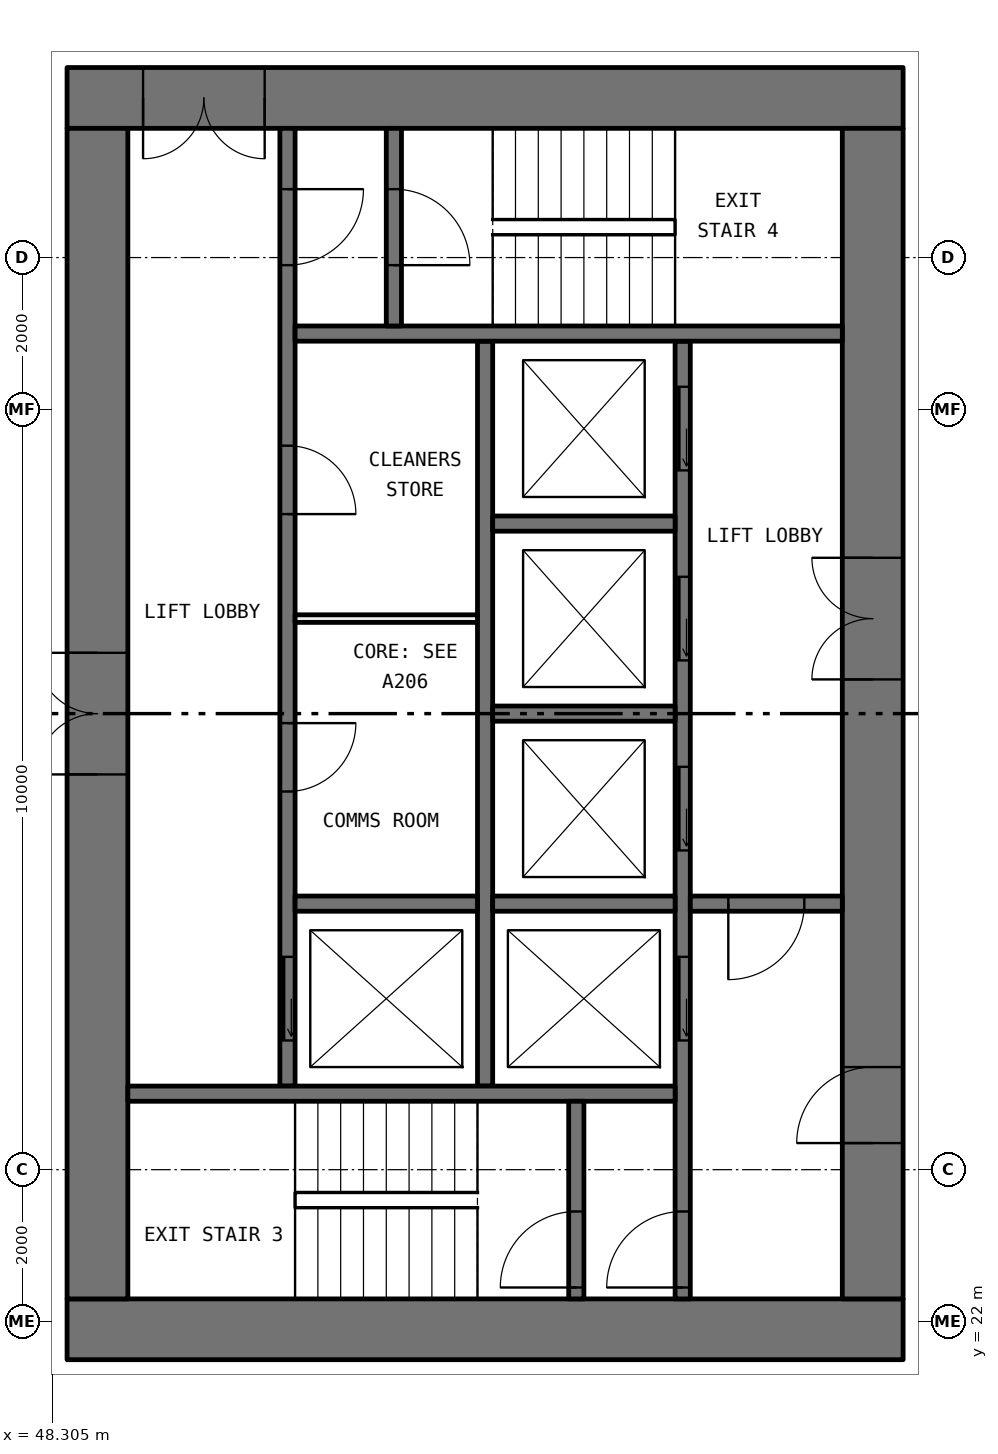
"""IFC4 building model, lengths in metres.
Left out: names, types, materials, properties, quantities, classifications, styles, units other than length and angle.
Written with IfcOpenShell. Run it as: python <this file> out.ifc"""

import sys

from ifc_helpers import new_model, si_unit, direction, frame, frame_2d, origin, place, context, subcontext, project, spatial, rectangle, extrude, element, fill, save


model = new_model("IFC4")
c1 = context("Model", 3, precision=1e-05, world=origin(), true_north=direction((0.0, 1.0)))
c2 = subcontext(c1, "Body", "Model", "MODEL_VIEW")
j1 = project(units=[si_unit("LENGTHUNIT", "METRE"), si_unit("PLANEANGLEUNIT", "RADIAN")], contexts=[c1])
p1 = place(None, origin())
s1 = spatial("IfcSite", under=j1, at=p1, CompositionType="ELEMENT")
p2 = place(p1, origin())
s2 = spatial("IfcBuilding", under=s1, at=p2, CompositionType="ELEMENT")
p3 = place(p2, frame((0.0, 0.0, 30.0)))
s3 = spatial("IfcBuildingStorey", under=s2, at=p3, CompositionType="ELEMENT", Elevation=30.0)
p4 = place(p3, frame((59.5, 21.9, 0.0), z_axis=(0.0, 0.0, 1.0), x_axis=(-1.0, 0.0, 0.0)))
e1 = element("IfcWall", 1, at=p4, inside=s3, PredefinedType="SHEAR", context=c2, shape_type="SweptSolid", body=[
    extrude(rectangle(XDim=11.0, YDim=0.8, at=frame_2d((5.5, 0.0))), origin(), (0.0, 0.0, 1.0), 3.05),
])
p5 = place(p3, frame((59.5, 38.1, 0.0), z_axis=(0.0, 0.0, 1.0), x_axis=(-1.0, 0.0, 0.0)))
e2 = element("IfcWall", 2, at=p5, inside=s3, PredefinedType="SHEAR", context=c2, shape_type="SweptSolid", body=[
    extrude(rectangle(XDim=11.0, YDim=0.8, at=frame_2d((5.5, 0.0))), origin(), (0.0, 0.0, 1.0), 3.05),
])
p6 = place(p5, frame((8.4, 0.0, 0.0)))
e3 = element("IfcOpeningElement", 3, at=p6, cuts=e2, PredefinedType="OPENING", context=c2, shape_type="SweptSolid", body=[
    extrude(rectangle(XDim=1.6, YDim=2.1, at=frame_2d((0.8, 1.05))), frame((0.0, 0.41, 0.0), z_axis=(0.0, -1.0, 0.0), x_axis=(1.0, 0.0, 0.0)), (0.0, 0.0, 1.0), 0.82),
])
p7 = place(p3, frame((59.1, 22.3, 0.0), z_axis=(0.0, 0.0, 1.0), x_axis=(0.0, 1.0, 0.0)))
e4 = element("IfcWall", 4, at=p7, inside=s3, PredefinedType="SHEAR", context=c2, shape_type="SweptSolid", body=[
    extrude(rectangle(XDim=15.4, YDim=0.8, at=frame_2d((7.7, 0.0))), origin(), (0.0, 0.0, 1.0), 3.05),
])
p8 = place(p7, frame((8.15, 0.0, 0.0)))
e5 = element("IfcOpeningElement", 5, at=p8, cuts=e4, PredefinedType="OPENING", context=c2, shape_type="SweptSolid", body=[
    extrude(rectangle(XDim=1.6, YDim=2.1, at=frame_2d((0.8, 1.05))), frame((0.0, 0.41, 0.0), z_axis=(0.0, -1.0, 0.0), x_axis=(1.0, 0.0, 0.0)), (0.0, 0.0, 1.0), 0.82),
])
p9 = place(p7, frame((2.05, 0.0, 0.0)))
e6 = element("IfcOpeningElement", 6, at=p9, cuts=e4, PredefinedType="OPENING", context=c2, shape_type="SweptSolid", body=[
    extrude(rectangle(XDim=1.0, YDim=2.1, at=frame_2d((0.5, 1.05))), frame((0.0, 0.41, 0.0), z_axis=(0.0, -1.0, 0.0), x_axis=(1.0, 0.0, 0.0)), (0.0, 0.0, 1.0), 0.82),
])
p10 = place(p3, frame((48.9, 22.3, 0.0), z_axis=(0.0, 0.0, 1.0), x_axis=(0.0, 1.0, 0.0)))
e7 = element("IfcWall", 7, at=p10, inside=s3, PredefinedType="SHEAR", context=c2, shape_type="SweptSolid", body=[
    extrude(rectangle(XDim=15.4, YDim=0.8, at=frame_2d((7.7, 0.0))), origin(), (0.0, 0.0, 1.0), 3.05),
])
p11 = place(p10, frame((6.9, 0.0, 0.0)))
e8 = element("IfcOpeningElement", 8, at=p11, cuts=e7, PredefinedType="OPENING", context=c2, shape_type="SweptSolid", body=[
    extrude(rectangle(XDim=1.6, YDim=2.1, at=frame_2d((0.8, 1.05))), frame((0.0, 0.41, 0.0), z_axis=(0.0, -1.0, 0.0), x_axis=(1.0, 0.0, 0.0)), (0.0, 0.0, 1.0), 0.82),
])
p12 = place(p3, frame((56.6, 22.3, 0.0), z_axis=(0.0, 0.0, 1.0), x_axis=(0.0, 1.0, 0.0)))
e9 = element("IfcWall", 9, at=p12, inside=s3, PredefinedType="SOLIDWALL", context=c2, shape_type="SweptSolid", body=[
    extrude(rectangle(XDim=12.6, YDim=0.2, at=frame_2d((6.3, 0.0))), origin(), (0.0, 0.0, 1.0), 3.05),
])
p13 = place(p12, frame((3.4, 0.0, 0.0)))
e10 = element("IfcOpeningElement", 10, at=p13, cuts=e9, PredefinedType="OPENING", context=c2, shape_type="SweptSolid", body=[
    extrude(rectangle(XDim=1.1, YDim=2.1, at=frame_2d((0.55, 1.05))), frame((0.0, 0.11, 0.0), z_axis=(0.0, -1.0, 0.0), x_axis=(1.0, 0.0, 0.0)), (0.0, 0.0, 1.0), 0.22),
])
p14 = place(p12, frame((5.9, 0.0, 0.0)))
e11 = element("IfcOpeningElement", 11, at=p14, cuts=e9, PredefinedType="OPENING", context=c2, shape_type="SweptSolid", body=[
    extrude(rectangle(XDim=1.1, YDim=2.1, at=frame_2d((0.55, 1.05))), frame((0.0, 0.11, 0.0), z_axis=(0.0, -1.0, 0.0), x_axis=(1.0, 0.0, 0.0)), (0.0, 0.0, 1.0), 0.22),
])
p15 = place(p12, frame((8.4, 0.0, 0.0)))
e12 = element("IfcOpeningElement", 12, at=p15, cuts=e9, PredefinedType="OPENING", context=c2, shape_type="SweptSolid", body=[
    extrude(rectangle(XDim=1.1, YDim=2.1, at=frame_2d((0.55, 1.05))), frame((0.0, 0.11, 0.0), z_axis=(0.0, -1.0, 0.0), x_axis=(1.0, 0.0, 0.0)), (0.0, 0.0, 1.0), 0.22),
])
p16 = place(p12, frame((10.9, 0.0, 0.0)))
e13 = element("IfcOpeningElement", 13, at=p16, cuts=e9, PredefinedType="OPENING", context=c2, shape_type="SweptSolid", body=[
    extrude(rectangle(XDim=1.1, YDim=2.1, at=frame_2d((0.55, 1.05))), frame((0.0, 0.11, 0.0), z_axis=(0.0, -1.0, 0.0), x_axis=(1.0, 0.0, 0.0)), (0.0, 0.0, 1.0), 0.22),
])
p17 = place(p12, frame((0.15, 0.0, 0.0)))
e14 = element("IfcOpeningElement", 14, at=p17, cuts=e9, PredefinedType="OPENING", context=c2, shape_type="SweptSolid", body=[
    extrude(rectangle(XDim=1.0, YDim=2.1, at=frame_2d((0.5, 1.05))), frame((0.0, 0.11, 0.0), z_axis=(0.0, -1.0, 0.0), x_axis=(1.0, 0.0, 0.0)), (0.0, 0.0, 1.0), 0.22),
])
p18 = place(p3, frame((51.4, 25.1, 0.0), z_axis=(0.0, 0.0, 1.0), x_axis=(0.0, 1.0, 0.0)))
e15 = element("IfcWall", 15, at=p18, inside=s3, PredefinedType="SOLIDWALL", context=c2, shape_type="SweptSolid", body=[
    extrude(rectangle(XDim=12.6, YDim=0.2, at=frame_2d((6.3, 0.0))), origin(), (0.0, 0.0, 1.0), 3.05),
])
p19 = place(p18, frame((0.6, 0.0, 0.0)))
e16 = element("IfcOpeningElement", 16, at=p19, cuts=e15, PredefinedType="OPENING", context=c2, shape_type="SweptSolid", body=[
    extrude(rectangle(XDim=1.1, YDim=2.1, at=frame_2d((0.55, 1.05))), frame((0.0, 0.11, 0.0), z_axis=(0.0, -1.0, 0.0), x_axis=(1.0, 0.0, 0.0)), (0.0, 0.0, 1.0), 0.22),
])
p20 = place(p18, frame((10.8, 0.0, 0.0)))
e17 = element("IfcOpeningElement", 17, at=p20, cuts=e15, PredefinedType="OPENING", context=c2, shape_type="SweptSolid", body=[
    extrude(rectangle(XDim=1.0, YDim=2.1, at=frame_2d((0.5, 1.05))), frame((0.0, 0.11, 0.0), z_axis=(0.0, -1.0, 0.0), x_axis=(1.0, 0.0, 0.0)), (0.0, 0.0, 1.0), 0.22),
])
p21 = place(p18, frame((3.875, 0.0, 0.0)))
e18 = element("IfcOpeningElement", 18, at=p21, cuts=e15, PredefinedType="OPENING", context=c2, shape_type="SweptSolid", body=[
    extrude(rectangle(XDim=0.9, YDim=2.1, at=frame_2d((0.45, 1.05))), frame((0.0, 0.11, 0.0), z_axis=(0.0, -1.0, 0.0), x_axis=(1.0, 0.0, 0.0)), (0.0, 0.0, 1.0), 0.22),
])
p22 = place(p18, frame((7.525, 0.0, 0.0)))
e19 = element("IfcOpeningElement", 19, at=p22, cuts=e15, PredefinedType="OPENING", context=c2, shape_type="SweptSolid", body=[
    extrude(rectangle(XDim=0.9, YDim=2.1, at=frame_2d((0.45, 1.05))), frame((0.0, 0.11, 0.0), z_axis=(0.0, -1.0, 0.0), x_axis=(1.0, 0.0, 0.0)), (0.0, 0.0, 1.0), 0.22),
])
p23 = place(p3, frame((54.0, 25.1, 0.0), z_axis=(0.0, 0.0, 1.0), x_axis=(0.0, 1.0, 0.0)))
e20 = element("IfcWall", 20, at=p23, inside=s3, PredefinedType="SOLIDWALL", context=c2, shape_type="SweptSolid", body=[
    extrude(rectangle(XDim=9.8, YDim=0.2, at=frame_2d((4.9, 0.0))), origin(), (0.0, 0.0, 1.0), 3.05),
])
for number, where, z_axis, x_axis in (
    (21, (56.5, 25.0, 0.0), (0.0, 0.0, 1.0), (-1.0, 0.0, 0.0)),
    (22, (58.7, 35.0, 0.0), (0.0, 0.0, 1.0), (-1.0, 0.0, 0.0)),
):
    element("IfcWall", number, at=place(p3, frame(where, z_axis=z_axis, x_axis=x_axis)), inside=s3, PredefinedType="SOLIDWALL", context=c2, shape_type="SweptSolid", body=[
        extrude(rectangle(XDim=7.2, YDim=0.2, at=frame_2d((3.6, 0.0))), origin(), (0.0, 0.0, 1.0), 3.05),
    ])
p24 = place(p3, frame((58.7, 27.5, 0.0), z_axis=(0.0, 0.0, 1.0), x_axis=(-1.0, 0.0, 0.0)))
e23 = element("IfcWall", 23, at=p24, inside=s3, PredefinedType="SOLIDWALL", context=c2, shape_type="SweptSolid", body=[
    extrude(rectangle(XDim=2.0, YDim=0.2, at=frame_2d((1.0, 0.0))), origin(), (0.0, 0.0, 1.0), 3.05),
])
p25 = place(p24, frame((0.5, 0.0, 0.0)))
e24 = element("IfcOpeningElement", 24, at=p25, cuts=e23, PredefinedType="OPENING", context=c2, shape_type="SweptSolid", body=[
    extrude(rectangle(XDim=1.0, YDim=2.1, at=frame_2d((0.5, 1.05))), frame((0.0, 0.11, 0.0), z_axis=(0.0, -1.0, 0.0), x_axis=(1.0, 0.0, 0.0)), (0.0, 0.0, 1.0), 0.22),
])
p26 = place(p3, frame((55.2, 22.3, 0.0), z_axis=(0.0, 0.0, 1.0), x_axis=(0.0, 1.0, 0.0)))
e25 = element("IfcWall", 25, at=p26, inside=s3, PredefinedType="SOLIDWALL", context=c2, shape_type="SweptSolid", body=[
    extrude(rectangle(XDim=2.6, YDim=0.2, at=frame_2d((1.3, 0.0))), origin(), (0.0, 0.0, 1.0), 3.05),
])
p27 = place(p26, frame((0.15, 0.0, 0.0)))
e26 = element("IfcOpeningElement", 26, at=p27, cuts=e25, PredefinedType="OPENING", context=c2, shape_type="SweptSolid", body=[
    extrude(rectangle(XDim=1.0, YDim=2.1, at=frame_2d((0.5, 1.05))), frame((0.0, 0.11, 0.0), z_axis=(0.0, -1.0, 0.0), x_axis=(1.0, 0.0, 0.0)), (0.0, 0.0, 1.0), 0.22),
])
p28 = place(p3, frame((52.8, 35.1, 0.0), z_axis=(0.0, 0.0, 1.0), x_axis=(0.0, 1.0, 0.0)))
e27 = element("IfcWall", 27, at=p28, inside=s3, PredefinedType="SOLIDWALL", context=c2, shape_type="SweptSolid", body=[
    extrude(rectangle(XDim=2.6, YDim=0.2, at=frame_2d((1.3, 0.0))), origin(), (0.0, 0.0, 1.0), 3.05),
])
p29 = place(p28, frame((0.8, 0.0, 0.0)))
e28 = element("IfcOpeningElement", 28, at=p29, cuts=e27, PredefinedType="OPENING", context=c2, shape_type="SweptSolid", body=[
    extrude(rectangle(XDim=1.0, YDim=2.1, at=frame_2d((0.5, 1.05))), frame((0.0, 0.11, 0.0), z_axis=(0.0, -1.0, 0.0), x_axis=(1.0, 0.0, 0.0)), (0.0, 0.0, 1.0), 0.22),
])
for number, where, z_axis, x_axis in (
    (29, (56.5, 27.5, 0.0), (0.0, 0.0, 1.0), (-1.0, 0.0, 0.0)),
    (30, (56.5, 30.0, 0.0), (0.0, 0.0, 1.0), (-1.0, 0.0, 0.0)),
    (31, (56.5, 32.5, 0.0), (0.0, 0.0, 1.0), (-1.0, 0.0, 0.0)),
    (32, (53.9, 27.5, 0.0), (0.0, 0.0, 1.0), (-1.0, 0.0, 0.0)),
):
    element("IfcWall", number, at=place(p3, frame(where, z_axis=z_axis, x_axis=x_axis)), inside=s3, PredefinedType="SOLIDWALL", context=c2, shape_type="SweptSolid", body=[
        extrude(rectangle(XDim=2.4, YDim=0.2, at=frame_2d((1.2, 0.0))), origin(), (0.0, 0.0, 1.0), 3.05),
    ])
p30 = place(p3, frame((53.9, 31.25, 0.0), z_axis=(0.0, 0.0, 1.0), x_axis=(-1.0, 0.0, 0.0)))
e33 = element("IfcWall", 33, at=p30, inside=s3, PredefinedType="PARTITIONING", context=c2, shape_type="SweptSolid", body=[
    extrude(rectangle(XDim=2.4, YDim=0.1, at=frame_2d((1.2, 0.0))), origin(), (0.0, 0.0, 1.0), 3.05),
])
p31 = place(p19, origin())
e34 = element("IfcDoor", 34, at=p31, inside=s3, OperationType="SLIDING_TO_LEFT", PredefinedType="DOOR", context=c2, shape_type="SweptSolid", body=[
    extrude(rectangle(XDim=1.1, YDim=2.1, at=frame_2d((0.55, 1.05))), frame((0.0, 0.025, 0.0), z_axis=(0.0, -1.0, 0.0), x_axis=(1.0, 0.0, 0.0)), (0.0, 0.0, 1.0), 0.05),
])
fill(e16, e34)
p32 = place(p13, origin())
e35 = element("IfcDoor", 35, at=p32, inside=s3, OperationType="SLIDING_TO_LEFT", PredefinedType="DOOR", context=c2, shape_type="SweptSolid", body=[
    extrude(rectangle(XDim=1.1, YDim=2.1, at=frame_2d((0.55, 1.05))), frame((0.0, 0.025, 0.0), z_axis=(0.0, -1.0, 0.0), x_axis=(1.0, 0.0, 0.0)), (0.0, 0.0, 1.0), 0.05),
])
fill(e10, e35)
p33 = place(p14, origin())
e36 = element("IfcDoor", 36, at=p33, inside=s3, OperationType="SLIDING_TO_LEFT", PredefinedType="DOOR", context=c2, shape_type="SweptSolid", body=[
    extrude(rectangle(XDim=1.1, YDim=2.1, at=frame_2d((0.55, 1.05))), frame((0.0, 0.025, 0.0), z_axis=(0.0, -1.0, 0.0), x_axis=(1.0, 0.0, 0.0)), (0.0, 0.0, 1.0), 0.05),
])
fill(e11, e36)
p34 = place(p15, origin())
e37 = element("IfcDoor", 37, at=p34, inside=s3, OperationType="SLIDING_TO_LEFT", PredefinedType="DOOR", context=c2, shape_type="SweptSolid", body=[
    extrude(rectangle(XDim=1.1, YDim=2.1, at=frame_2d((0.55, 1.05))), frame((0.0, 0.025, 0.0), z_axis=(0.0, -1.0, 0.0), x_axis=(1.0, 0.0, 0.0)), (0.0, 0.0, 1.0), 0.05),
])
fill(e12, e37)
p35 = place(p16, origin())
e38 = element("IfcDoor", 38, at=p35, inside=s3, OperationType="SLIDING_TO_LEFT", PredefinedType="DOOR", context=c2, shape_type="SweptSolid", body=[
    extrude(rectangle(XDim=1.1, YDim=2.1, at=frame_2d((0.55, 1.05))), frame((0.0, 0.025, 0.0), z_axis=(0.0, -1.0, 0.0), x_axis=(1.0, 0.0, 0.0)), (0.0, 0.0, 1.0), 0.05),
])
fill(e13, e38)
p36 = place(p27, origin())
e39 = element("IfcDoor", 39, at=p36, inside=s3, OperationType="SINGLE_SWING_RIGHT", PredefinedType="DOOR", context=c2, shape_type="SweptSolid", body=[
    extrude(rectangle(XDim=1.0, YDim=2.1, at=frame_2d((0.5, 1.05))), frame((0.0, 0.025, 0.0), z_axis=(0.0, -1.0, 0.0), x_axis=(1.0, 0.0, 0.0)), (0.0, 0.0, 1.0), 0.05),
])
fill(e26, e39)
p37 = place(p17, origin())
e40 = element("IfcDoor", 40, at=p37, inside=s3, OperationType="SINGLE_SWING_RIGHT", PredefinedType="DOOR", context=c2, shape_type="SweptSolid", body=[
    extrude(rectangle(XDim=1.0, YDim=2.1, at=frame_2d((0.5, 1.05))), frame((0.0, 0.025, 0.0), z_axis=(0.0, -1.0, 0.0), x_axis=(1.0, 0.0, 0.0)), (0.0, 0.0, 1.0), 0.05),
])
fill(e14, e40)
p38 = place(p20, frame((1.0, 0.0, 0.0), x_axis=(-1.0, 0.0, 0.0)))
e41 = element("IfcDoor", 41, at=p38, inside=s3, OperationType="SINGLE_SWING_RIGHT", PredefinedType="DOOR", context=c2, shape_type="SweptSolid", body=[
    extrude(rectangle(XDim=1.0, YDim=2.1, at=frame_2d((0.5, 1.05))), frame((0.0, 0.025, 0.0), z_axis=(0.0, -1.0, 0.0), x_axis=(1.0, 0.0, 0.0)), (0.0, 0.0, 1.0), 0.05),
])
fill(e17, e41)
p39 = place(p29, frame((1.0, 0.0, 0.0), x_axis=(-1.0, 0.0, 0.0)))
e42 = element("IfcDoor", 42, at=p39, inside=s3, OperationType="SINGLE_SWING_LEFT", PredefinedType="DOOR", context=c2, shape_type="SweptSolid", body=[
    extrude(rectangle(XDim=1.0, YDim=2.1, at=frame_2d((0.5, 1.05))), frame((0.0, 0.025, 0.0), z_axis=(0.0, -1.0, 0.0), x_axis=(1.0, 0.0, 0.0)), (0.0, 0.0, 1.0), 0.05),
])
fill(e28, e42)
p40 = place(p25, origin())
e43 = element("IfcDoor", 43, at=p40, inside=s3, OperationType="SINGLE_SWING_LEFT", PredefinedType="DOOR", context=c2, shape_type="SweptSolid", body=[
    extrude(rectangle(XDim=1.0, YDim=2.1, at=frame_2d((0.5, 1.05))), frame((0.0, 0.025, 0.0), z_axis=(0.0, -1.0, 0.0), x_axis=(1.0, 0.0, 0.0)), (0.0, 0.0, 1.0), 0.05),
])
fill(e24, e43)
p41 = place(p8, origin())
e44 = element("IfcDoor", 44, at=p41, inside=s3, OperationType="DOUBLE_DOOR_SINGLE_SWING", PredefinedType="DOOR", context=c2, shape_type="SweptSolid", body=[
    extrude(rectangle(XDim=1.6, YDim=2.1, at=frame_2d((0.8, 1.05))), frame((0.0, 0.025, 0.0), z_axis=(0.0, -1.0, 0.0), x_axis=(1.0, 0.0, 0.0)), (0.0, 0.0, 1.0), 0.05),
])
fill(e5, e44)
p42 = place(p9, origin())
e45 = element("IfcDoor", 45, at=p42, inside=s3, OperationType="SINGLE_SWING_RIGHT", PredefinedType="DOOR", context=c2, shape_type="SweptSolid", body=[
    extrude(rectangle(XDim=1.0, YDim=2.1, at=frame_2d((0.5, 1.05))), frame((0.0, 0.025, 0.0), z_axis=(0.0, -1.0, 0.0), x_axis=(1.0, 0.0, 0.0)), (0.0, 0.0, 1.0), 0.05),
])
fill(e6, e45)
p43 = place(p6, origin())
e46 = element("IfcDoor", 46, at=p43, inside=s3, OperationType="DOUBLE_DOOR_SINGLE_SWING", PredefinedType="DOOR", context=c2, shape_type="SweptSolid", body=[
    extrude(rectangle(XDim=1.6, YDim=2.1, at=frame_2d((0.8, 1.05))), frame((0.0, 0.025, 0.0), z_axis=(0.0, -1.0, 0.0), x_axis=(1.0, 0.0, 0.0)), (0.0, 0.0, 1.0), 0.05),
])
fill(e3, e46)
p44 = place(p11, origin())
e47 = element("IfcDoor", 47, at=p44, inside=s3, OperationType="DOUBLE_DOOR_SINGLE_SWING", PredefinedType="DOOR", context=c2, shape_type="SweptSolid", body=[
    extrude(rectangle(XDim=1.6, YDim=2.1, at=frame_2d((0.8, 1.05))), frame((0.0, 0.025, 0.0), z_axis=(0.0, -1.0, 0.0), x_axis=(1.0, 0.0, 0.0)), (0.0, 0.0, 1.0), 0.05),
])
fill(e8, e47)
p45 = place(p21, frame((0.9, 0.0, 0.0), x_axis=(-1.0, 0.0, 0.0)))
e48 = element("IfcDoor", 48, at=p45, inside=s3, OperationType="SINGLE_SWING_RIGHT", PredefinedType="DOOR", context=c2, shape_type="SweptSolid", body=[
    extrude(rectangle(XDim=0.9, YDim=2.1, at=frame_2d((0.45, 1.05))), frame((0.0, 0.025, 0.0), z_axis=(0.0, -1.0, 0.0), x_axis=(1.0, 0.0, 0.0)), (0.0, 0.0, 1.0), 0.05),
])
fill(e18, e48)
p46 = place(p22, frame((0.9, 0.0, 0.0), x_axis=(-1.0, 0.0, 0.0)))
e49 = element("IfcDoor", 49, at=p46, inside=s3, OperationType="SINGLE_SWING_LEFT", PredefinedType="DOOR", context=c2, shape_type="SweptSolid", body=[
    extrude(rectangle(XDim=0.9, YDim=2.1, at=frame_2d((0.45, 1.05))), frame((0.0, 0.025, 0.0), z_axis=(0.0, -1.0, 0.0), x_axis=(1.0, 0.0, 0.0)), (0.0, 0.0, 1.0), 0.05),
])
fill(e19, e49)
save(model, sys.argv[1])
